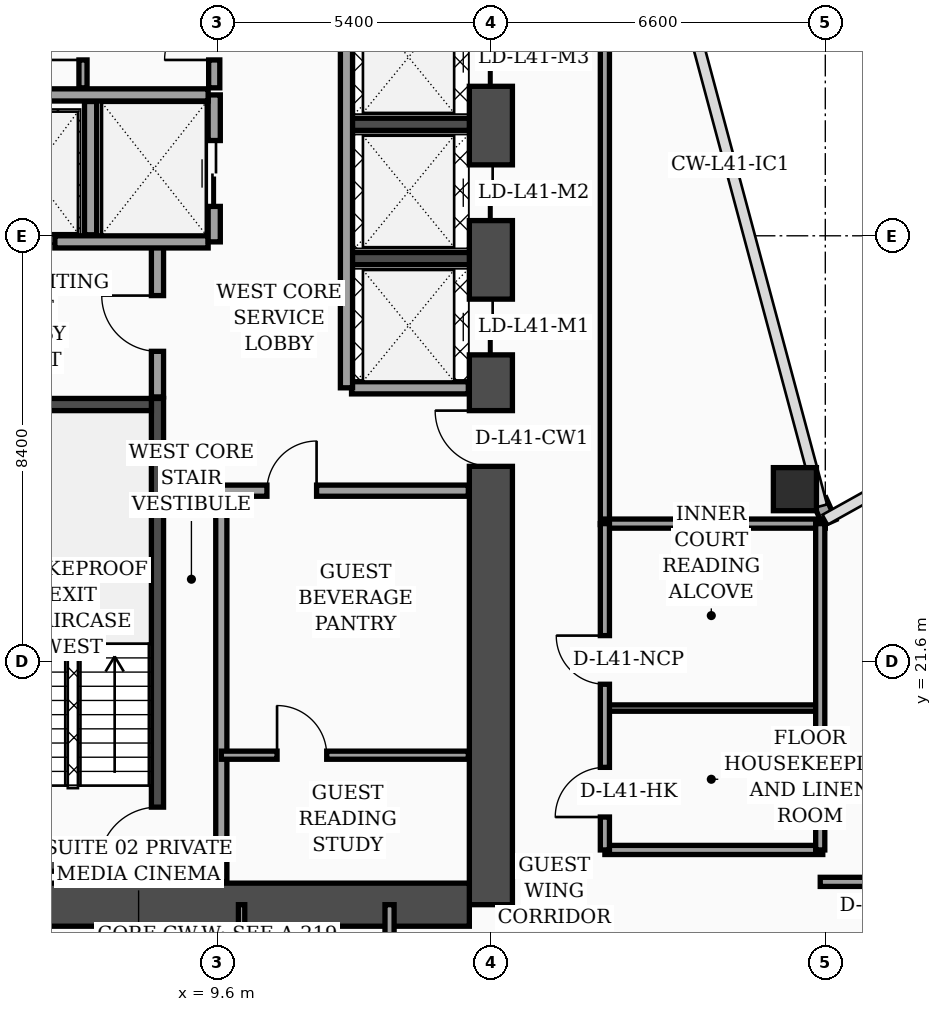
"""IFC4 building model, lengths in metres.
Left out: names, types, materials, properties, quantities, classifications, styles, units other than length and angle.
Written with IfcOpenShell. Run it as: python <this file> out.ifc"""

import sys

from ifc_helpers import new_model, si_unit, direction, frame, frame_2d, origin, origin_2d, place, context, subcontext, project, spatial, rectangle, hollow_rectangle, extrude, element, fill, save


model = new_model("IFC4")
c1 = context("Model", 3, precision=1e-05, world=origin(), true_north=direction((0.0, 1.0)))
c2 = subcontext(c1, "Body", "Model", "MODEL_VIEW")
j1 = project(units=[si_unit("LENGTHUNIT", "METRE"), si_unit("PLANEANGLEUNIT", "RADIAN")], contexts=[c1])
p1 = place(None, origin())
s1 = spatial("IfcSite", under=j1, at=p1, CompositionType="ELEMENT")
p2 = place(p1, origin())
s2 = spatial("IfcBuilding", under=s1, at=p2, CompositionType="ELEMENT")
p3 = place(p2, frame((0.0, 0.0, 167.5)))
s3 = spatial("IfcBuildingStorey", under=s2, at=p3, CompositionType="ELEMENT", Elevation=167.5)
p4 = place(p3, frame((15.0, 16.8, 0.0), z_axis=(0.0, 0.0, 1.0), x_axis=(0.0, 1.0, 0.0)))
e1 = element("IfcWall", 1, at=p4, inside=s3, PredefinedType="SHEAR", context=c2, shape_type="SweptSolid", body=[
    extrude(rectangle(XDim=21.6, YDim=0.85, at=frame_2d((10.8, 0.0))), origin(), (0.0, 0.0, 1.0), 3.56),
])
p5 = place(p4, frame((8.65, 0.0, 0.0)))
e2 = element("IfcOpeningElement", 2, at=p5, cuts=e1, PredefinedType="OPENING", context=c2, shape_type="SweptSolid", body=[
    extrude(rectangle(XDim=1.1, YDim=2.2, at=frame_2d((0.55, 1.1))), frame((0.0, 0.435, 0.0), z_axis=(0.0, -1.0, 0.0), x_axis=(1.0, 0.0, 0.0)), (0.0, 0.0, 1.0), 0.87),
])
p6 = place(p4, frame((10.85, 0.0, 0.0)))
e3 = element("IfcOpeningElement", 3, at=p6, cuts=e1, PredefinedType="OPENING", context=c2, shape_type="SweptSolid", body=[
    extrude(rectangle(XDim=1.1, YDim=2.2, at=frame_2d((0.55, 1.1))), frame((0.0, 0.435, 0.0), z_axis=(0.0, -1.0, 0.0), x_axis=(1.0, 0.0, 0.0)), (0.0, 0.0, 1.0), 0.87),
])
p7 = place(p4, frame((13.5, 0.0, 0.0)))
e4 = element("IfcOpeningElement", 4, at=p7, cuts=e1, PredefinedType="OPENING", context=c2, shape_type="SweptSolid", body=[
    extrude(rectangle(XDim=1.1, YDim=2.2, at=frame_2d((0.55, 1.1))), frame((0.0, 0.435, 0.0), z_axis=(0.0, -1.0, 0.0), x_axis=(1.0, 0.0, 0.0)), (0.0, 0.0, 1.0), 0.87),
])
p8 = place(p4, frame((16.15, 0.0, 0.0)))
e5 = element("IfcOpeningElement", 5, at=p8, cuts=e1, PredefinedType="OPENING", context=c2, shape_type="SweptSolid", body=[
    extrude(rectangle(XDim=1.1, YDim=2.2, at=frame_2d((0.55, 1.1))), frame((0.0, 0.435, 0.0), z_axis=(0.0, -1.0, 0.0), x_axis=(1.0, 0.0, 0.0)), (0.0, 0.0, 1.0), 0.87),
])
p9 = place(p3, frame((4.625, 16.8, 0.0), z_axis=(0.0, 0.0, 1.0), x_axis=(1.0, 0.0, 0.0)))
e6 = element("IfcWall", 6, at=p9, inside=s3, PredefinedType="SHEAR", context=c2, shape_type="SweptSolid", body=[
    extrude(rectangle(XDim=9.95, YDim=0.85, at=frame_2d((4.975, 0.0))), origin(), (0.0, 0.0, 1.0), 3.56),
])
p10 = place(p3, frame((8.42, 17.225, 0.0), z_axis=(0.0, 0.0, 1.0), x_axis=(0.0, 1.0, 0.0)))
e7 = element("IfcWall", 7, at=p10, inside=s3, PredefinedType="SOLIDWALL", context=c2, shape_type="SweptSolid", body=[
    extrude(rectangle(XDim=9.565, YDim=0.24, at=frame_2d((4.782, 0.0))), origin(), (0.0, 0.0, 1.0), 3.56),
])
p11 = place(p10, frame((0.35, 0.0, 0.0)))
e8 = element("IfcOpeningElement", 8, at=p11, cuts=e7, PredefinedType="OPENING", context=c2, shape_type="SweptSolid", body=[
    extrude(rectangle(XDim=1.15, YDim=2.2, at=frame_2d((0.575, 1.1))), frame((0.0, 0.13, 0.0), z_axis=(0.0, -1.0, 0.0), x_axis=(1.0, 0.0, 0.0)), (0.0, 0.0, 1.0), 0.26),
])
for number, where, z_axis, x_axis in (
    (9, (5.2, 17.58, 0.0), (0.0, 0.0, 1.0), (1.0, 0.0, 0.0)),
    (10, (5.2, 26.67, 0.0), (0.0, 0.0, 1.0), (1.0, 0.0, 0.0)),
):
    element("IfcWall", number, at=place(p3, frame(where, z_axis=z_axis, x_axis=x_axis)), inside=s3, PredefinedType="SOLIDWALL", context=c2, shape_type="SweptSolid", body=[
        extrude(rectangle(XDim=3.1, YDim=0.24, at=frame_2d((1.55, 0.0))), origin(), (0.0, 0.0, 1.0), 3.56),
    ])
for number, where, z_axis, x_axis in (
    (11, (12.18, 29.55, 0.0), (0.0, 0.0, 1.0), (1.0, 0.0, 0.0)),
    (12, (12.18, 32.2, 0.0), (0.0, 0.0, 1.0), (1.0, 0.0, 0.0)),
):
    element("IfcWall", number, at=place(p3, frame(where, z_axis=z_axis, x_axis=x_axis)), inside=s3, PredefinedType="SOLIDWALL", context=c2, shape_type="SweptSolid", body=[
        extrude(rectangle(XDim=2.395, YDim=0.24, at=frame_2d((1.198, 0.0))), origin(), (0.0, 0.0, 1.0), 3.56),
    ])
p12 = place(p3, frame((21.0, 25.0, 0.0), z_axis=(0.0, 0.0, 1.0), x_axis=(1.0, 0.0, 0.0)))
e13 = element("IfcColumn", 13, at=p12, inside=s3, PredefinedType="COLUMN", context=c2, shape_type="SweptSolid", body=[
    extrude(hollow_rectangle(XDim=0.85, YDim=0.85, WallThickness=0.036, at=origin_2d()), origin(), (0.0, 0.0, 1.0), 3.56),
])
p13 = place(p3, frame((21.68, 24.34, 0.0), z_axis=(0.0, 0.0, 1.0), x_axis=(-0.40758134973, 0.913168901875, 0.0)))
e14 = element("IfcWall", 14, at=p13, inside=s3, PredefinedType="SOLIDWALL", context=c2, shape_type="SweptSolid", body=[
    extrude(rectangle(XDim=0.471, YDim=0.28, at=frame_2d((0.235, 0.0))), origin(), (0.0, 0.0, 1.0), 3.56),
])
p14 = place(p3, frame((8.42, 26.82, 0.0), z_axis=(0.0, 0.0, 1.0), x_axis=(0.0, 1.0, 0.0)))
e15 = element("IfcWall", 15, at=p14, inside=s3, PredefinedType="SOLIDWALL", context=c2, shape_type="SweptSolid", body=[
    extrude(rectangle(XDim=3.0, YDim=0.24, at=frame_2d((1.5, 0.0))), origin(), (0.0, 0.0, 1.0), 3.56),
])
p15 = place(p14, frame((0.9, 0.0, 0.0)))
e16 = element("IfcOpeningElement", 16, at=p15, cuts=e15, PredefinedType="OPENING", context=c2, shape_type="SweptSolid", body=[
    extrude(rectangle(XDim=1.1, YDim=2.2, at=frame_2d((0.55, 1.1))), frame((0.0, 0.13, 0.0), z_axis=(0.0, -1.0, 0.0), x_axis=(1.0, 0.0, 0.0)), (0.0, 0.0, 1.0), 0.26),
])
p16 = place(p3, frame((4.645, 29.88, 0.0), z_axis=(0.0, 0.0, 1.0), x_axis=(1.0, 0.0, 0.0)))
e17 = element("IfcWall", 17, at=p16, inside=s3, PredefinedType="SOLIDWALL", context=c2, shape_type="SweptSolid", body=[
    extrude(rectangle(XDim=4.775, YDim=0.24, at=frame_2d((2.387, 0.0))), origin(), (0.0, 0.0, 1.0), 3.56),
])
p17 = place(p16, frame((0.45, 0.0, 0.0)))
e18 = element("IfcOpeningElement", 18, at=p17, cuts=e17, PredefinedType="OPENING", context=c2, shape_type="SweptSolid", body=[
    extrude(rectangle(XDim=1.3, YDim=2.35, at=frame_2d((0.65, 1.175))), frame((0.0, 0.13, 0.0), z_axis=(0.0, -1.0, 0.0), x_axis=(1.0, 0.0, 0.0)), (0.0, 0.0, 1.0), 0.26),
])
p18 = place(p3, frame((7.1, 30.02, 0.0), z_axis=(0.0, 0.0, 1.0), x_axis=(0.0, 1.0, 0.0)))
e19 = element("IfcWall", 19, at=p18, inside=s3, PredefinedType="SOLIDWALL", context=c2, shape_type="SweptSolid", body=[
    extrude(rectangle(XDim=2.63, YDim=0.24, at=frame_2d((1.315, 0.0))), origin(), (0.0, 0.0, 1.0), 3.56),
])
p19 = place(p3, frame((9.54, 29.88, 0.0), z_axis=(0.0, 0.0, 1.0), x_axis=(0.0, 1.0, 0.0)))
e20 = element("IfcWall", 20, at=p19, inside=s3, PredefinedType="SOLIDWALL", context=c2, shape_type="SweptSolid", body=[
    extrude(rectangle(XDim=2.9, YDim=0.24, at=frame_2d((1.45, 0.0))), origin(), (0.0, 0.0, 1.0), 3.56),
])
p20 = place(p19, frame((0.7, 0.0, 0.0)))
e21 = element("IfcOpeningElement", 21, at=p20, cuts=e20, PredefinedType="OPENING", context=c2, shape_type="SweptSolid", body=[
    extrude(rectangle(XDim=1.3, YDim=2.35, at=frame_2d((0.65, 1.175))), frame((0.0, 0.13, 0.0), z_axis=(0.0, -1.0, 0.0), x_axis=(1.0, 0.0, 0.0)), (0.0, 0.0, 1.0), 0.26),
])
p21 = place(p3, frame((4.645, 32.78, 0.0), z_axis=(0.0, 0.0, 1.0), x_axis=(1.0, 0.0, 0.0)))
e22 = element("IfcWall", 22, at=p21, inside=s3, PredefinedType="SOLIDWALL", context=c2, shape_type="SweptSolid", body=[
    extrude(rectangle(XDim=4.775, YDim=0.24, at=frame_2d((2.387, 0.0))), origin(), (0.0, 0.0, 1.0), 3.19),
])
p22 = place(p3, frame((9.68, 17.245, 0.0), z_axis=(0.0, 0.0, 1.0), x_axis=(0.0, 1.0, 0.0)))
e23 = element("IfcWall", 23, at=p22, inside=s3, PredefinedType="SOLIDWALL", context=c2, shape_type="SweptSolid", body=[
    extrude(rectangle(XDim=7.755, YDim=0.22, at=frame_2d((3.877, 0.0))), origin(), (0.0, 0.0, 1.0), 3.56),
])
p23 = place(p3, frame((6.95, 32.92, 0.0), z_axis=(0.0, 0.0, 1.0), x_axis=(0.0, 1.0, 0.0)))
e24 = element("IfcWall", 24, at=p23, inside=s3, PredefinedType="PARTITIONING", context=c2, shape_type="SweptSolid", body=[
    extrude(rectangle(XDim=5.035, YDim=0.16, at=frame_2d((2.518, 0.0))), origin(), (0.0, 0.0, 1.0), 3.56),
])
p24 = place(p23, frame((0.55, 0.0, 0.0)))
e25 = element("IfcOpeningElement", 25, at=p24, cuts=e24, PredefinedType="OPENING", context=c2, shape_type="SweptSolid", body=[
    extrude(rectangle(XDim=0.98, YDim=2.15, at=frame_2d((0.49, 1.075))), frame((0.0, 0.09, 0.0), z_axis=(0.0, -1.0, 0.0), x_axis=(1.0, 0.0, 0.0)), (0.0, 0.0, 1.0), 0.18),
])
p25 = place(p3, frame((9.54, 32.92, 0.0), z_axis=(0.0, 0.0, 1.0), x_axis=(0.0, 1.0, 0.0)))
e26 = element("IfcWall", 26, at=p25, inside=s3, PredefinedType="SOLIDWALL", context=c2, shape_type="SweptSolid", body=[
    extrude(rectangle(XDim=5.035, YDim=0.22, at=frame_2d((2.518, 0.0))), origin(), (0.0, 0.0, 1.0), 3.56),
])
p26 = place(p25, frame((0.55, 0.0, 0.0)))
e27 = element("IfcOpeningElement", 27, at=p26, cuts=e26, PredefinedType="OPENING", context=c2, shape_type="SweptSolid", body=[
    extrude(rectangle(XDim=0.98, YDim=2.15, at=frame_2d((0.49, 1.075))), frame((0.0, 0.12, 0.0), z_axis=(0.0, -1.0, 0.0), x_axis=(1.0, 0.0, 0.0)), (0.0, 0.0, 1.0), 0.24),
])
p27 = place(p3, frame((9.68, 19.75, 0.0), z_axis=(0.0, 0.0, 1.0), x_axis=(1.0, 0.0, 0.0)))
e28 = element("IfcWall", 28, at=p27, inside=s3, PredefinedType="PARTITIONING", context=c2, shape_type="SweptSolid", body=[
    extrude(rectangle(XDim=4.875, YDim=0.16, at=frame_2d((2.438, 0.0))), origin(), (0.0, 0.0, 1.0), 3.56),
])
p28 = place(p27, frame((1.1, 0.0, 0.0)))
e29 = element("IfcOpeningElement", 29, at=p28, cuts=e28, PredefinedType="OPENING", context=c2, shape_type="SweptSolid", body=[
    extrude(rectangle(XDim=0.98, YDim=2.15, at=frame_2d((0.49, 1.075))), frame((0.0, 0.09, 0.0), z_axis=(0.0, -1.0, 0.0), x_axis=(1.0, 0.0, 0.0)), (0.0, 0.0, 1.0), 0.18),
])
p29 = place(p3, frame((9.68, 24.97, 0.0), z_axis=(0.0, 0.0, 1.0), x_axis=(1.0, 0.0, 0.0)))
e30 = element("IfcWall", 30, at=p29, inside=s3, PredefinedType="SOLIDWALL", context=c2, shape_type="SweptSolid", body=[
    extrude(rectangle(XDim=4.875, YDim=0.22, at=frame_2d((2.438, 0.0))), origin(), (0.0, 0.0, 1.0), 2.94),
])
p30 = place(p29, frame((0.9, 0.0, 0.0)))
e31 = element("IfcOpeningElement", 31, at=p30, cuts=e30, PredefinedType="OPENING", context=c2, shape_type="SweptSolid", body=[
    extrude(rectangle(XDim=0.98, YDim=2.15, at=frame_2d((0.49, 1.075))), frame((0.0, 0.12, 0.0), z_axis=(0.0, -1.0, 0.0), x_axis=(1.0, 0.0, 0.0)), (0.0, 0.0, 1.0), 0.24),
])
p31 = place(p3, frame((12.25, 27.0, 0.0), z_axis=(0.0, 0.0, 1.0), x_axis=(1.0, 0.0, 0.0)))
e32 = element("IfcWall", 32, at=p31, inside=s3, PredefinedType="SOLIDWALL", context=c2, shape_type="SweptSolid", body=[
    extrude(rectangle(XDim=2.305, YDim=0.24, at=frame_2d((1.152, 0.0))), origin(), (0.0, 0.0, 1.0), 3.56),
])
p32 = place(p3, frame((12.15, 27.0, 0.0), z_axis=(0.0, 0.0, 1.0), x_axis=(0.0, 1.0, 0.0)))
e33 = element("IfcWall", 33, at=p32, inside=s3, PredefinedType="SOLIDWALL", context=c2, shape_type="SweptSolid", body=[
    extrude(rectangle(XDim=7.75, YDim=0.24, at=frame_2d((3.875, 0.0))), origin(), (0.0, 0.0, 1.0), 3.56),
])
p33 = place(p3, frame((10.08, 14.75, 0.0), z_axis=(0.0, 0.0, 1.0), x_axis=(0.0, 1.0, 0.0)))
e34 = element("IfcWall", 34, at=p33, inside=s3, PredefinedType="PARTITIONING", context=c2, shape_type="SweptSolid", body=[
    extrude(rectangle(XDim=2.05, YDim=0.125, at=frame_2d((1.025, 0.0))), origin(), (0.0, 0.0, 1.0), 3.56),
])
p34 = place(p3, frame((13.0, 2.44, 0.0), z_axis=(0.0, 0.0, 1.0), x_axis=(0.0, 1.0, 0.0)))
e35 = element("IfcWall", 35, at=p34, inside=s3, PredefinedType="PARTITIONING", context=c2, shape_type="SweptSolid", body=[
    extrude(rectangle(XDim=14.36, YDim=0.18, at=frame_2d((7.18, 0.0))), origin(), (0.0, 0.0, 1.0), 2.94),
])
p35 = place(p34, frame((3.01, 0.0, 0.0)))
e36 = element("IfcOpeningElement", 36, at=p35, cuts=e35, PredefinedType="OPENING", context=c2, shape_type="SweptSolid", body=[
    extrude(rectangle(XDim=1.02, YDim=2.2, at=frame_2d((0.51, 1.1))), frame((0.0, 0.1, 0.0), z_axis=(0.0, -1.0, 0.0), x_axis=(1.0, 0.0, 0.0)), (0.0, 0.0, 1.0), 0.2),
])
p36 = place(p34, frame((10.1, 0.0, 0.0)))
e37 = element("IfcOpeningElement", 37, at=p36, cuts=e35, PredefinedType="OPENING", context=c2, shape_type="SweptSolid", body=[
    extrude(rectangle(XDim=1.02, YDim=2.2, at=frame_2d((0.51, 1.1))), frame((0.0, 0.1, 0.0), z_axis=(0.0, -1.0, 0.0), x_axis=(1.0, 0.0, 0.0)), (0.0, 0.0, 1.0), 0.2),
])
p37 = place(p3, frame((17.25, 24.3, 0.0), z_axis=(0.0, 0.0, 1.0), x_axis=(0.0, 1.0, 0.0)))
e38 = element("IfcWall", 38, at=p37, inside=s3, PredefinedType="PARTITIONING", context=c2, shape_type="SweptSolid", body=[
    extrude(rectangle(XDim=17.65, YDim=0.18, at=frame_2d((8.825, 0.0))), origin(), (0.0, 0.0, 1.0), 2.94),
])
p38 = place(p3, frame((17.25, 17.88, 0.0), z_axis=(0.0, 0.0, 1.0), x_axis=(1.0, 0.0, 0.0)))
e39 = element("IfcWall", 39, at=p38, inside=s3, PredefinedType="PARTITIONING", context=c2, shape_type="SweptSolid", body=[
    extrude(rectangle(XDim=4.3, YDim=0.18, at=frame_2d((2.15, 0.0))), origin(), (0.0, 0.0, 1.0), 3.56),
])
p39 = place(p3, frame((17.25, 20.68, 0.0), z_axis=(0.0, 0.0, 1.0), x_axis=(1.0, 0.0, 0.0)))
e40 = element("IfcWall", 40, at=p39, inside=s3, PredefinedType="PARTITIONING", context=c2, shape_type="SweptSolid", body=[
    extrude(rectangle(XDim=4.3, YDim=0.125, at=frame_2d((2.15, 0.0))), origin(), (0.0, 0.0, 1.0), 3.56),
])
p40 = place(p3, frame((17.25, 24.32, 0.0), z_axis=(0.0, 0.0, 1.0), x_axis=(1.0, 0.0, 0.0)))
e41 = element("IfcWall", 41, at=p40, inside=s3, PredefinedType="PARTITIONING", context=c2, shape_type="SweptSolid", body=[
    extrude(rectangle(XDim=4.35, YDim=0.18, at=frame_2d((2.175, 0.0))), origin(), (0.0, 0.0, 1.0), 3.56),
])
p41 = place(p3, frame((21.5, 17.88, 0.0), z_axis=(0.0, 0.0, 1.0), x_axis=(0.0, 1.0, 0.0)))
e42 = element("IfcWall", 42, at=p41, inside=s3, PredefinedType="PARTITIONING", context=c2, shape_type="SweptSolid", body=[
    extrude(rectangle(XDim=6.44, YDim=0.18, at=frame_2d((3.22, 0.0))), origin(), (0.0, 0.0, 1.0), 3.56),
])
p42 = place(p3, frame((17.25, 17.88, 0.0), z_axis=(0.0, 0.0, 1.0), x_axis=(0.0, 1.0, 0.0)))
e43 = element("IfcWall", 43, at=p42, inside=s3, PredefinedType="PARTITIONING", context=c2, shape_type="SweptSolid", body=[
    extrude(rectangle(XDim=6.44, YDim=0.18, at=frame_2d((3.22, 0.0))), origin(), (0.0, 0.0, 1.0), 3.56),
])
p43 = place(p42, frame((0.65, 0.0, 0.0)))
e44 = element("IfcOpeningElement", 44, at=p43, cuts=e43, PredefinedType="OPENING", context=c2, shape_type="SweptSolid", body=[
    extrude(rectangle(XDim=0.98, YDim=2.15, at=frame_2d((0.49, 1.075))), frame((0.0, 0.1, 0.0), z_axis=(0.0, -1.0, 0.0), x_axis=(1.0, 0.0, 0.0)), (0.0, 0.0, 1.0), 0.2),
])
p44 = place(p42, frame((3.27, 0.0, 0.0)))
e45 = element("IfcOpeningElement", 45, at=p44, cuts=e43, PredefinedType="OPENING", context=c2, shape_type="SweptSolid", body=[
    extrude(rectangle(XDim=0.96, YDim=2.2, at=frame_2d((0.48, 1.1))), frame((0.0, 0.1, 0.0), z_axis=(0.0, -1.0, 0.0), x_axis=(1.0, 0.0, 0.0)), (0.0, 0.0, 1.0), 0.2),
])
p45 = place(p3, frame((21.5, 17.25, 0.0), z_axis=(0.0, 0.0, 1.0), x_axis=(1.0, 0.0, 0.0)))
e46 = element("IfcWall", 46, at=p45, inside=s3, PredefinedType="PARTITIONING", context=c2, shape_type="SweptSolid", body=[
    extrude(rectangle(XDim=24.25, YDim=0.18, at=frame_2d((12.125, 0.0))), origin(), (0.0, 0.0, 1.0), 2.94),
])
p46 = place(p45, frame((0.95, 0.0, 0.0)))
e47 = element("IfcOpeningElement", 47, at=p46, cuts=e46, PredefinedType="OPENING", context=c2, shape_type="SweptSolid", body=[
    extrude(rectangle(XDim=1.02, YDim=2.2, at=frame_2d((0.51, 1.1))), frame((0.0, 0.1, 0.0), z_axis=(0.0, -1.0, 0.0), x_axis=(1.0, 0.0, 0.0)), (0.0, 0.0, 1.0), 0.2),
])
p47 = place(p45, frame((13.02, 0.0, 0.0)))
e48 = element("IfcOpeningElement", 48, at=p47, cuts=e46, PredefinedType="OPENING", context=c2, shape_type="SweptSolid", body=[
    extrude(rectangle(XDim=1.02, YDim=2.2, at=frame_2d((0.51, 1.1))), frame((0.0, 0.1, 0.0), z_axis=(0.0, -1.0, 0.0), x_axis=(1.0, 0.0, 0.0)), (0.0, 0.0, 1.0), 0.2),
])
p48 = place(p15, origin())
e49 = element("IfcDoor", 49, at=p48, inside=s3, OperationType="SINGLE_SWING_RIGHT", PredefinedType="DOOR", context=c2, shape_type="SweptSolid", body=[
    extrude(rectangle(XDim=1.1, YDim=2.2, at=frame_2d((0.55, 1.1))), frame((0.0, 0.025, 0.0), z_axis=(0.0, -1.0, 0.0), x_axis=(1.0, 0.0, 0.0)), (0.0, 0.0, 1.0), 0.05),
])
fill(e16, e49)
p49 = place(p17, origin())
e50 = element("IfcDoor", 50, at=p49, inside=s3, OperationType="DOUBLE_DOOR_SLIDING", PredefinedType="DOOR", context=c2, shape_type="SweptSolid", body=[
    extrude(rectangle(XDim=1.3, YDim=2.35, at=frame_2d((0.65, 1.175))), frame((0.0, 0.025, 0.0), z_axis=(0.0, -1.0, 0.0), x_axis=(1.0, 0.0, 0.0)), (0.0, 0.0, 1.0), 0.05),
])
fill(e18, e50)
p50 = place(p20, origin())
e51 = element("IfcDoor", 51, at=p50, inside=s3, OperationType="DOUBLE_DOOR_SLIDING", PredefinedType="DOOR", context=c2, shape_type="SweptSolid", body=[
    extrude(rectangle(XDim=1.3, YDim=2.35, at=frame_2d((0.65, 1.175))), frame((0.0, 0.025, 0.0), z_axis=(0.0, -1.0, 0.0), x_axis=(1.0, 0.0, 0.0)), (0.0, 0.0, 1.0), 0.05),
])
fill(e21, e51)
p51 = place(p24, origin())
e52 = element("IfcDoor", 52, at=p51, inside=s3, OperationType="SINGLE_SWING_LEFT", PredefinedType="DOOR", context=c2, shape_type="SweptSolid", body=[
    extrude(rectangle(XDim=0.98, YDim=2.15, at=frame_2d((0.49, 1.075))), frame((0.0, 0.025, 0.0), z_axis=(0.0, -1.0, 0.0), x_axis=(1.0, 0.0, 0.0)), (0.0, 0.0, 1.0), 0.05),
])
fill(e25, e52)
p52 = place(p26, origin())
e53 = element("IfcDoor", 53, at=p52, inside=s3, OperationType="SINGLE_SWING_LEFT", PredefinedType="DOOR", context=c2, shape_type="SweptSolid", body=[
    extrude(rectangle(XDim=0.98, YDim=2.15, at=frame_2d((0.49, 1.075))), frame((0.0, 0.025, 0.0), z_axis=(0.0, -1.0, 0.0), x_axis=(1.0, 0.0, 0.0)), (0.0, 0.0, 1.0), 0.05),
])
fill(e27, e53)
p53 = place(p28, origin())
e54 = element("IfcDoor", 54, at=p53, inside=s3, OperationType="SINGLE_SWING_LEFT", PredefinedType="DOOR", context=c2, shape_type="SweptSolid", body=[
    extrude(rectangle(XDim=0.98, YDim=2.15, at=frame_2d((0.49, 1.075))), frame((0.0, 0.025, 0.0), z_axis=(0.0, -1.0, 0.0), x_axis=(1.0, 0.0, 0.0)), (0.0, 0.0, 1.0), 0.05),
])
fill(e29, e54)
p54 = place(p30, origin())
e55 = element("IfcDoor", 55, at=p54, inside=s3, OperationType="SINGLE_SWING_RIGHT", PredefinedType="DOOR", context=c2, shape_type="SweptSolid", body=[
    extrude(rectangle(XDim=0.98, YDim=2.15, at=frame_2d((0.49, 1.075))), frame((0.0, 0.025, 0.0), z_axis=(0.0, -1.0, 0.0), x_axis=(1.0, 0.0, 0.0)), (0.0, 0.0, 1.0), 0.05),
])
fill(e31, e55)
p55 = place(p43, origin())
e56 = element("IfcDoor", 56, at=p55, inside=s3, OperationType="SINGLE_SWING_LEFT", PredefinedType="DOOR", context=c2, shape_type="SweptSolid", body=[
    extrude(rectangle(XDim=0.98, YDim=2.15, at=frame_2d((0.49, 1.075))), frame((0.0, 0.025, 0.0), z_axis=(0.0, -1.0, 0.0), x_axis=(1.0, 0.0, 0.0)), (0.0, 0.0, 1.0), 0.05),
])
fill(e44, e56)
p56 = place(p44, origin())
e57 = element("IfcDoor", 57, at=p56, inside=s3, OperationType="SINGLE_SWING_RIGHT", PredefinedType="DOOR", context=c2, shape_type="SweptSolid", body=[
    extrude(rectangle(XDim=0.96, YDim=2.2, at=frame_2d((0.48, 1.1))), frame((0.0, 0.025, 0.0), z_axis=(0.0, -1.0, 0.0), x_axis=(1.0, 0.0, 0.0)), (0.0, 0.0, 1.0), 0.05),
])
fill(e45, e57)
p57 = place(p11, origin())
e58 = element("IfcDoor", 58, at=p57, inside=s3, OperationType="SINGLE_SWING_LEFT", PredefinedType="DOOR", context=c2, shape_type="SweptSolid", body=[
    extrude(rectangle(XDim=1.15, YDim=2.2, at=frame_2d((0.575, 1.1))), frame((0.0, 0.025, 0.0), z_axis=(0.0, -1.0, 0.0), x_axis=(1.0, 0.0, 0.0)), (0.0, 0.0, 1.0), 0.05),
])
fill(e8, e58)
p58 = place(p5, origin())
e59 = element("IfcDoor", 59, at=p58, inside=s3, OperationType="SINGLE_SWING_RIGHT", PredefinedType="DOOR", context=c2, shape_type="SweptSolid", body=[
    extrude(rectangle(XDim=1.1, YDim=2.2, at=frame_2d((0.55, 1.1))), frame((0.0, 0.025, 0.0), z_axis=(0.0, -1.0, 0.0), x_axis=(1.0, 0.0, 0.0)), (0.0, 0.0, 1.0), 0.05),
])
fill(e2, e59)
p59 = place(p6, origin())
e60 = element("IfcDoor", 60, at=p59, inside=s3, OperationType="DOUBLE_DOOR_SLIDING", PredefinedType="DOOR", context=c2, shape_type="SweptSolid", body=[
    extrude(rectangle(XDim=1.1, YDim=2.2, at=frame_2d((0.55, 1.1))), frame((0.0, 0.025, 0.0), z_axis=(0.0, -1.0, 0.0), x_axis=(1.0, 0.0, 0.0)), (0.0, 0.0, 1.0), 0.05),
])
fill(e3, e60)
p60 = place(p7, origin())
e61 = element("IfcDoor", 61, at=p60, inside=s3, OperationType="DOUBLE_DOOR_SLIDING", PredefinedType="DOOR", context=c2, shape_type="SweptSolid", body=[
    extrude(rectangle(XDim=1.1, YDim=2.2, at=frame_2d((0.55, 1.1))), frame((0.0, 0.025, 0.0), z_axis=(0.0, -1.0, 0.0), x_axis=(1.0, 0.0, 0.0)), (0.0, 0.0, 1.0), 0.05),
])
fill(e4, e61)
p61 = place(p8, origin())
e62 = element("IfcDoor", 62, at=p61, inside=s3, OperationType="DOUBLE_DOOR_SLIDING", PredefinedType="DOOR", context=c2, shape_type="SweptSolid", body=[
    extrude(rectangle(XDim=1.1, YDim=2.2, at=frame_2d((0.55, 1.1))), frame((0.0, 0.025, 0.0), z_axis=(0.0, -1.0, 0.0), x_axis=(1.0, 0.0, 0.0)), (0.0, 0.0, 1.0), 0.05),
])
fill(e5, e62)
save(model, sys.argv[1])
